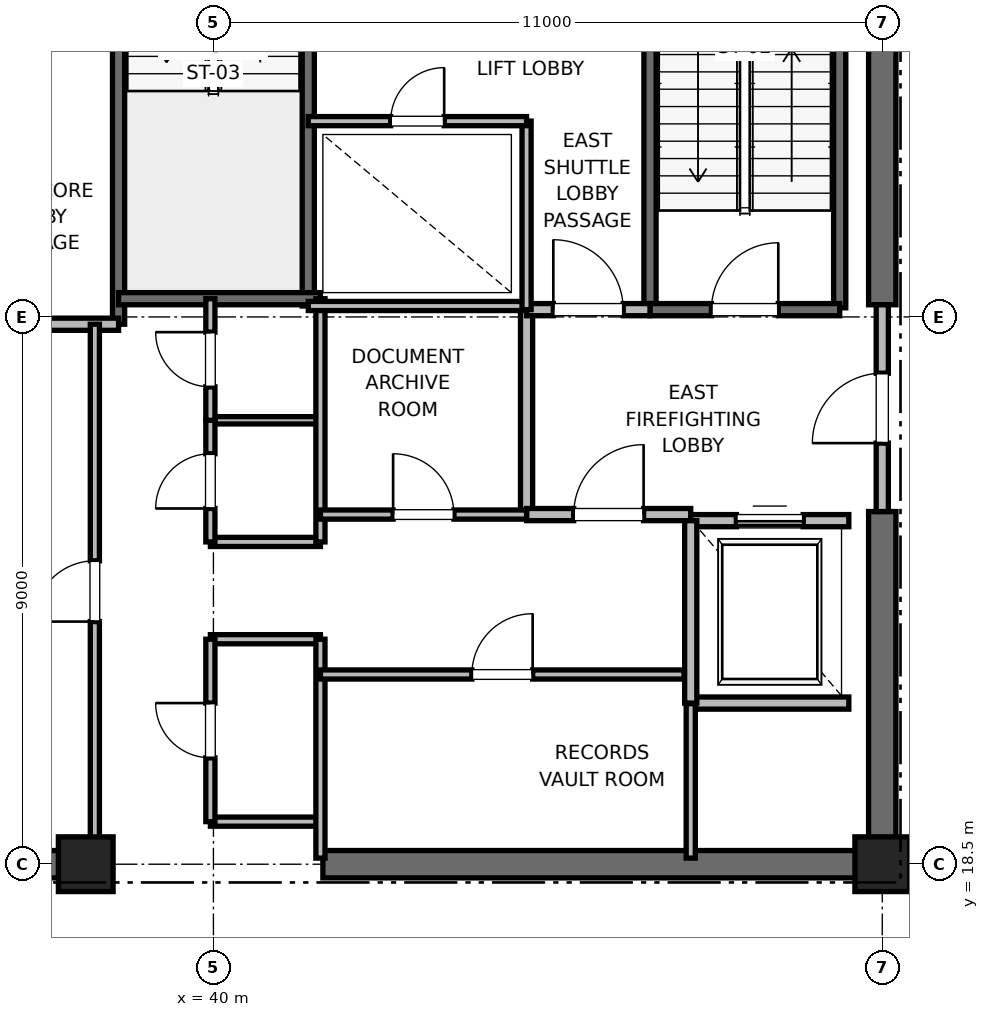
"""IFC4 building model, lengths in metres.
Left out: names, types, materials, properties, quantities, classifications, styles, units other than length and angle.
Written with IfcOpenShell. Run it as: python <this file> out.ifc"""

import sys

from ifc_helpers import new_model, si_unit, direction, frame, frame_2d, origin, origin_2d, place, context, subcontext, project, spatial, rectangle, extrude, element, fill, save


model = new_model("IFC4")
c1 = context("Model", 3, precision=1e-05, world=origin(), true_north=direction((0.0, 1.0)))
c2 = subcontext(c1, "Body", "Model", "MODEL_VIEW")
j1 = project(units=[si_unit("LENGTHUNIT", "METRE"), si_unit("PLANEANGLEUNIT", "RADIAN")], contexts=[c1])
p1 = place(None, origin())
s1 = spatial("IfcSite", under=j1, at=p1, CompositionType="ELEMENT")
p2 = place(p1, origin())
s2 = spatial("IfcBuilding", under=s1, at=p2, CompositionType="ELEMENT")
p3 = place(p2, frame((0.0, 0.0, 263.2)))
s3 = spatial("IfcBuildingStorey", under=s2, at=p3, CompositionType="ELEMENT", Elevation=263.2)
for number, where, z_axis, x_axis in (
    (1, (51.0, 18.5, 0.0), (0.0, 0.0, 1.0), (1.0, 0.0, 0.0)),
    (2, (37.9, 18.5, 0.0), (0.0, 0.0, 1.0), (1.0, 0.0, 0.0)),
):
    element("IfcColumn", number, at=place(p3, frame(where, z_axis=z_axis, x_axis=x_axis)), inside=s3, PredefinedType="PILASTER", context=c2, shape_type="SweptSolid", body=[
        extrude(rectangle(XDim=0.9, YDim=0.9, at=origin_2d()), origin(), (0.0, 0.0, 1.0), 4.0),
    ])
for number, where, z_axis, x_axis in (
    (3, (29.0, 18.5, 0.0), (0.0, 0.0, 1.0), (1.0, 0.0, 0.0)),
    (4, (41.8, 18.5, 0.0), (0.0, 0.0, 1.0), (1.0, 0.0, 0.0)),
):
    element("IfcWall", number, at=place(p3, frame(where, z_axis=z_axis, x_axis=x_axis)), inside=s3, PredefinedType="SHEAR", context=c2, shape_type="SweptSolid", body=[
        extrude(rectangle(XDim=9.2, YDim=0.45, at=frame_2d((4.6, 0.0))), origin(), (0.0, 0.0, 1.0), 3.785),
    ])
p4 = place(p3, frame((51.0, 18.5, 0.0), z_axis=(0.0, 0.0, 1.0), x_axis=(0.0, 1.0, 0.0)))
e5 = element("IfcWall", 5, at=p4, inside=s3, PredefinedType="SHEAR", context=c2, shape_type="SweptSolid", body=[
    extrude(rectangle(XDim=5.8, YDim=0.45, at=frame_2d((2.9, 0.0))), origin(), (0.0, 0.0, 1.0), 3.785),
])
p5 = place(p3, frame((51.0, 27.7, 0.0), z_axis=(0.0, 0.0, 1.0), x_axis=(0.0, 1.0, 0.0)))
e6 = element("IfcWall", 6, at=p5, inside=s3, PredefinedType="SHEAR", context=c2, shape_type="SweptSolid", body=[
    extrude(rectangle(XDim=8.8, YDim=0.45, at=frame_2d((4.4, 0.0))), origin(), (0.0, 0.0, 1.0), 3.785),
])
p6 = place(p3, frame((50.3, 27.65, 0.0), z_axis=(0.0, 0.0, 1.0), x_axis=(0.0, 1.0, 0.0)))
e7 = element("IfcWall", 7, at=p6, inside=s3, PredefinedType="SOLIDWALL", context=c2, shape_type="SweptSolid", body=[
    extrude(rectangle(XDim=8.15, YDim=0.2, at=frame_2d((4.075, 0.0))), origin(), (0.0, 0.0, 1.0), 3.785),
])
p7 = place(p3, frame((47.18, 27.62, 0.0), z_axis=(0.0, 0.0, 1.0), x_axis=(0.0, 1.0, 0.0)))
e8 = element("IfcWall", 8, at=p7, inside=s3, PredefinedType="SOLIDWALL", context=c2, shape_type="SweptSolid", body=[
    extrude(rectangle(XDim=8.18, YDim=0.2, at=frame_2d((4.09, 0.0))), origin(), (0.0, 0.0, 1.0), 3.785),
])
p8 = place(p3, frame((47.18, 27.62, 0.0), z_axis=(0.0, 0.0, 1.0), x_axis=(1.0, 0.0, 0.0)))
e9 = element("IfcWall", 9, at=p8, inside=s3, PredefinedType="SOLIDWALL", context=c2, shape_type="SweptSolid", body=[
    extrude(rectangle(XDim=3.12, YDim=0.2, at=frame_2d((1.56, 0.0))), origin(), (0.0, 0.0, 1.0), 3.785),
])
p9 = place(p8, frame((1.01, 0.0, 0.0)))
e10 = element("IfcOpeningElement", 10, at=p9, cuts=e9, PredefinedType="OPENING", context=c2, shape_type="SweptSolid", body=[
    extrude(rectangle(XDim=1.1, YDim=2.15, at=frame_2d((0.55, 1.075))), frame((0.0, 0.1, 0.0), z_axis=(0.0, -1.0, 0.0), x_axis=(1.0, 0.0, 0.0)), (0.0, 0.0, 1.0), 0.2),
])
p10 = place(p3, frame((38.44, 27.38, 0.0), z_axis=(0.0, 0.0, 1.0), x_axis=(0.0, 1.0, 0.0)))
e11 = element("IfcWall", 11, at=p10, inside=s3, PredefinedType="SOLIDWALL", context=c2, shape_type="SweptSolid", body=[
    extrude(rectangle(XDim=8.87, YDim=0.2, at=frame_2d((4.435, 0.0))), origin(), (0.0, 0.0, 1.0), 3.785),
])
p11 = place(p3, frame((41.56, 27.68, 0.0), z_axis=(0.0, 0.0, 1.0), x_axis=(0.0, 1.0, 0.0)))
e12 = element("IfcWall", 12, at=p11, inside=s3, PredefinedType="SOLIDWALL", context=c2, shape_type="SweptSolid", body=[
    extrude(rectangle(XDim=8.57, YDim=0.2, at=frame_2d((4.285, 0.0))), origin(), (0.0, 0.0, 1.0), 3.785),
])
p12 = place(p3, frame((38.44, 27.8, 0.0), z_axis=(0.0, 0.0, 1.0), x_axis=(1.0, 0.0, 0.0)))
e13 = element("IfcWall", 13, at=p12, inside=s3, PredefinedType="SOLIDWALL", context=c2, shape_type="SweptSolid", body=[
    extrude(rectangle(XDim=3.32, YDim=0.2, at=frame_2d((1.66, 0.0))), origin(), (0.0, 0.0, 1.0), 3.785),
])
p13 = place(p3, frame((32.82, 27.38, 0.0), z_axis=(0.0, 0.0, 1.0), x_axis=(1.0, 0.0, 0.0)))
e14 = element("IfcWall", 14, at=p13, inside=s3, PredefinedType="PARTITIONING", context=c2, shape_type="SweptSolid", body=[
    extrude(rectangle(XDim=5.62, YDim=0.2, at=frame_2d((2.81, 0.0))), origin(), (0.0, 0.0, 1.0), 3.785),
])
p14 = place(p3, frame((45.15, 24.25, 0.0), z_axis=(0.0, 0.0, 1.0), x_axis=(0.0, 1.0, 0.0)))
e15 = element("IfcWall", 15, at=p14, inside=s3, PredefinedType="PARTITIONING", context=c2, shape_type="SweptSolid", body=[
    extrude(rectangle(XDim=3.37, YDim=0.2, at=frame_2d((1.685, 0.0))), origin(), (0.0, 0.0, 1.0), 3.785),
])
p15 = place(p3, frame((45.15, 24.25, 0.0), z_axis=(0.0, 0.0, 1.0), x_axis=(1.0, 0.0, 0.0)))
e16 = element("IfcWall", 16, at=p15, inside=s3, PredefinedType="PARTITIONING", context=c2, shape_type="SweptSolid", body=[
    extrude(rectangle(XDim=2.7, YDim=0.2, at=frame_2d((1.35, 0.0))), origin(), (0.0, 0.0, 1.0), 3.785),
])
p16 = place(p15, frame((0.775, 0.0, 0.0)))
e17 = element("IfcOpeningElement", 17, at=p16, cuts=e16, PredefinedType="OPENING", context=c2, shape_type="SweptSolid", body=[
    extrude(rectangle(XDim=1.15, YDim=2.2, at=frame_2d((0.575, 1.1))), frame((0.0, 0.1, 0.0), z_axis=(0.0, -1.0, 0.0), x_axis=(1.0, 0.0, 0.0)), (0.0, 0.0, 1.0), 0.2),
])
p17 = place(p3, frame((45.15, 27.62, 0.0), z_axis=(0.0, 0.0, 1.0), x_axis=(1.0, 0.0, 0.0)))
e18 = element("IfcWall", 18, at=p17, inside=s3, PredefinedType="PARTITIONING", context=c2, shape_type="SweptSolid", body=[
    extrude(rectangle(XDim=2.03, YDim=0.2, at=frame_2d((1.015, 0.0))), origin(), (0.0, 0.0, 1.0), 3.785),
])
p18 = place(p17, frame((0.44, 0.0, 0.0)))
e19 = element("IfcOpeningElement", 19, at=p18, cuts=e18, PredefinedType="OPENING", context=c2, shape_type="SweptSolid", body=[
    extrude(rectangle(XDim=1.15, YDim=2.2, at=frame_2d((0.575, 1.1))), frame((0.0, 0.1, 0.0), z_axis=(0.0, -1.0, 0.0), x_axis=(1.0, 0.0, 0.0)), (0.0, 0.0, 1.0), 0.2),
])
p19 = place(p3, frame((51.0, 24.3, 0.0), z_axis=(0.0, 0.0, 1.0), x_axis=(0.0, 1.0, 0.0)))
e20 = element("IfcWall", 20, at=p19, inside=s3, PredefinedType="PARTITIONING", context=c2, shape_type="SweptSolid", body=[
    extrude(rectangle(XDim=3.4, YDim=0.2, at=frame_2d((1.7, 0.0))), origin(), (0.0, 0.0, 1.0), 2.865),
])
p20 = place(p19, frame((1.125, 0.0, 0.0)))
e21 = element("IfcOpeningElement", 21, at=p20, cuts=e20, PredefinedType="OPENING", context=c2, shape_type="SweptSolid", body=[
    extrude(rectangle(XDim=1.15, YDim=2.2, at=frame_2d((0.575, 1.1))), frame((0.0, 0.1, 0.0), z_axis=(0.0, -1.0, 0.0), x_axis=(1.0, 0.0, 0.0)), (0.0, 0.0, 1.0), 0.2),
])
p21 = place(p3, frame((47.85, 21.15, 0.0), z_axis=(0.0, 0.0, 1.0), x_axis=(1.0, 0.0, 0.0)))
e22 = element("IfcWall", 22, at=p21, inside=s3, PredefinedType="SOLIDWALL", context=c2, shape_type="SweptSolid", body=[
    extrude(rectangle(XDim=2.6, YDim=0.2, at=frame_2d((1.3, 0.0))), origin(), (0.0, 0.0, 1.0), 3.785),
])
p22 = place(p3, frame((50.45, 24.15, 0.0), z_axis=(0.0, 0.0, 1.0), x_axis=(-1.0, 0.0, 0.0)))
e23 = element("IfcWall", 23, at=p22, inside=s3, PredefinedType="SOLIDWALL", context=c2, shape_type="SweptSolid", body=[
    extrude(rectangle(XDim=2.6, YDim=0.2, at=frame_2d((1.3, 0.0))), origin(), (0.0, 0.0, 1.0), 2.865),
])
p23 = place(p22, frame((0.75, 0.0, 0.0)))
e24 = element("IfcOpeningElement", 24, at=p23, cuts=e23, PredefinedType="OPENING", context=c2, shape_type="SweptSolid", body=[
    extrude(rectangle(XDim=1.1, YDim=2.2, at=frame_2d((0.55, 1.1))), frame((0.0, 0.1, 0.0), z_axis=(0.0, -1.0, 0.0), x_axis=(1.0, 0.0, 0.0)), (0.0, 0.0, 1.0), 0.2),
])
p24 = place(p3, frame((47.85, 24.15, 0.0), z_axis=(0.0, 0.0, 1.0), x_axis=(0.0, -1.0, 0.0)))
e25 = element("IfcWall", 25, at=p24, inside=s3, PredefinedType="SOLIDWALL", context=c2, shape_type="SweptSolid", body=[
    extrude(rectangle(XDim=3.0, YDim=0.2, at=frame_2d((1.5, 0.0))), origin(), (0.0, 0.0, 1.0), 3.785),
])
for number, where, z_axis, x_axis in (
    (26, (39.95, 19.2, 0.0), (0.0, 0.0, 1.0), (1.0, 0.0, 0.0)),
    (27, (39.95, 22.2, 0.0), (0.0, 0.0, 1.0), (1.0, 0.0, 0.0)),
    (28, (39.95, 23.8, 0.0), (0.0, 0.0, 1.0), (1.0, 0.0, 0.0)),
):
    element("IfcWall", number, at=place(p3, frame(where, z_axis=z_axis, x_axis=x_axis)), inside=s3, PredefinedType="PARTITIONING", context=c2, shape_type="SweptSolid", body=[
        extrude(rectangle(XDim=1.81, YDim=0.15, at=frame_2d((0.905, 0.0))), origin(), (0.0, 0.0, 1.0), 2.85),
    ])
p25 = place(p3, frame((39.95, 25.8, 0.0), z_axis=(0.0, 0.0, 1.0), x_axis=(1.0, 0.0, 0.0)))
e29 = element("IfcWall", 29, at=p25, inside=s3, PredefinedType="PARTITIONING", context=c2, shape_type="SweptSolid", body=[
    extrude(rectangle(XDim=1.81, YDim=0.12, at=frame_2d((0.905, 0.0))), origin(), (0.0, 0.0, 1.0), 2.85),
])
p26 = place(p3, frame((41.76, 18.6, 0.0), z_axis=(0.0, 0.0, 1.0), x_axis=(0.0, 1.0, 0.0)))
e30 = element("IfcWall", 30, at=p26, inside=s3, PredefinedType="PARTITIONING", context=c2, shape_type="SweptSolid", body=[
    extrude(rectangle(XDim=3.6, YDim=0.15, at=frame_2d((1.8, 0.0))), origin(), (0.0, 0.0, 1.0), 2.85),
])
p27 = place(p3, frame((41.76, 23.8, 0.0), z_axis=(0.0, 0.0, 1.0), x_axis=(0.0, 1.0, 0.0)))
e31 = element("IfcWall", 31, at=p27, inside=s3, PredefinedType="PARTITIONING", context=c2, shape_type="SweptSolid", body=[
    extrude(rectangle(XDim=4.0, YDim=0.15, at=frame_2d((2.0, 0.0))), origin(), (0.0, 0.0, 1.0), 2.85),
])
p28 = place(p3, frame((39.95, 19.2, 0.0), z_axis=(0.0, 0.0, 1.0), x_axis=(0.0, 1.0, 0.0)))
e32 = element("IfcWall", 32, at=p28, inside=s3, PredefinedType="PARTITIONING", context=c2, shape_type="SweptSolid", body=[
    extrude(rectangle(XDim=3.0, YDim=0.15, at=frame_2d((1.5, 0.0))), origin(), (0.0, 0.0, 1.0), 2.85),
])
p29 = place(p28, frame((1.05, 0.0, 0.0)))
e33 = element("IfcOpeningElement", 33, at=p29, cuts=e32, PredefinedType="OPENING", context=c2, shape_type="SweptSolid", body=[
    extrude(rectangle(XDim=0.9, YDim=2.1, at=frame_2d((0.45, 1.05))), frame((0.0, 0.075, 0.0), z_axis=(0.0, -1.0, 0.0), x_axis=(1.0, 0.0, 0.0)), (0.0, 0.0, 1.0), 0.15),
])
p30 = place(p3, frame((39.95, 23.8, 0.0), z_axis=(0.0, 0.0, 1.0), x_axis=(0.0, 1.0, 0.0)))
e34 = element("IfcWall", 34, at=p30, inside=s3, PredefinedType="PARTITIONING", context=c2, shape_type="SweptSolid", body=[
    extrude(rectangle(XDim=2.0, YDim=0.15, at=frame_2d((1.0, 0.0))), origin(), (0.0, 0.0, 1.0), 2.85),
])
p31 = place(p30, frame((0.55, 0.0, 0.0)))
e35 = element("IfcOpeningElement", 35, at=p31, cuts=e34, PredefinedType="OPENING", context=c2, shape_type="SweptSolid", body=[
    extrude(rectangle(XDim=0.9, YDim=2.1, at=frame_2d((0.45, 1.05))), frame((0.0, 0.075, 0.0), z_axis=(0.0, -1.0, 0.0), x_axis=(1.0, 0.0, 0.0)), (0.0, 0.0, 1.0), 0.15),
])
p32 = place(p3, frame((39.95, 25.8, 0.0), z_axis=(0.0, 0.0, 1.0), x_axis=(0.0, 1.0, 0.0)))
e36 = element("IfcWall", 36, at=p32, inside=s3, PredefinedType="PARTITIONING", context=c2, shape_type="SweptSolid", body=[
    extrude(rectangle(XDim=2.0, YDim=0.15, at=frame_2d((1.0, 0.0))), origin(), (0.0, 0.0, 1.0), 2.85),
])
p33 = place(p32, frame((0.55, 0.0, 0.0)))
e37 = element("IfcOpeningElement", 37, at=p33, cuts=e36, PredefinedType="OPENING", context=c2, shape_type="SweptSolid", body=[
    extrude(rectangle(XDim=0.9, YDim=2.1, at=frame_2d((0.45, 1.05))), frame((0.0, 0.075, 0.0), z_axis=(0.0, -1.0, 0.0), x_axis=(1.0, 0.0, 0.0)), (0.0, 0.0, 1.0), 0.15),
])
p34 = place(p3, frame((38.05, 18.6, 0.0), z_axis=(0.0, 0.0, 1.0), x_axis=(0.0, 1.0, 0.0)))
e38 = element("IfcWall", 38, at=p34, inside=s3, PredefinedType="PARTITIONING", context=c2, shape_type="SweptSolid", body=[
    extrude(rectangle(XDim=8.78, YDim=0.15, at=frame_2d((4.39, 0.0))), origin(), (0.0, 0.0, 1.0), 2.85),
])
p35 = place(p34, frame((3.89, 0.0, 0.0)))
e39 = element("IfcOpeningElement", 39, at=p35, cuts=e38, PredefinedType="OPENING", context=c2, shape_type="SweptSolid", body=[
    extrude(rectangle(XDim=1.0, YDim=2.15, at=frame_2d((0.5, 1.075))), frame((0.0, 0.075, 0.0), z_axis=(0.0, -1.0, 0.0), x_axis=(1.0, 0.0, 0.0)), (0.0, 0.0, 1.0), 0.15),
])
p36 = place(p3, frame((41.56, 27.68, 0.0), z_axis=(0.0, 0.0, 1.0), x_axis=(1.0, 0.0, 0.0)))
e40 = element("IfcWall", 40, at=p36, inside=s3, PredefinedType="PARTITIONING", context=c2, shape_type="SweptSolid", body=[
    extrude(rectangle(XDim=3.59, YDim=0.15, at=frame_2d((1.795, 0.0))), origin(), (0.0, 0.0, 1.0), 2.85),
])
p37 = place(p3, frame((47.85, 18.6, 0.0), z_axis=(0.0, 0.0, 1.0), x_axis=(0.0, 1.0, 0.0)))
e41 = element("IfcWall", 41, at=p37, inside=s3, PredefinedType="PARTITIONING", context=c2, shape_type="SweptSolid", body=[
    extrude(rectangle(XDim=2.54, YDim=0.15, at=frame_2d((1.27, 0.0))), origin(), (0.0, 0.0, 1.0), 2.85),
])
p38 = place(p3, frame((41.76, 21.62, 0.0), z_axis=(0.0, 0.0, 1.0), x_axis=(1.0, 0.0, 0.0)))
e42 = element("IfcWall", 42, at=p38, inside=s3, PredefinedType="PARTITIONING", context=c2, shape_type="SweptSolid", body=[
    extrude(rectangle(XDim=5.98, YDim=0.15, at=frame_2d((2.99, 0.0))), origin(), (0.0, 0.0, 1.0), 2.85),
])
p39 = place(p38, frame((2.49, 0.0, 0.0)))
e43 = element("IfcOpeningElement", 43, at=p39, cuts=e42, PredefinedType="OPENING", context=c2, shape_type="SweptSolid", body=[
    extrude(rectangle(XDim=1.0, YDim=2.15, at=frame_2d((0.5, 1.075))), frame((0.0, 0.075, 0.0), z_axis=(0.0, -1.0, 0.0), x_axis=(1.0, 0.0, 0.0)), (0.0, 0.0, 1.0), 0.15),
])
p40 = place(p3, frame((41.76, 24.25, 0.0), z_axis=(0.0, 0.0, 1.0), x_axis=(1.0, 0.0, 0.0)))
e44 = element("IfcWall", 44, at=p40, inside=s3, PredefinedType="PARTITIONING", context=c2, shape_type="SweptSolid", body=[
    extrude(rectangle(XDim=3.39, YDim=0.15, at=frame_2d((1.695, 0.0))), origin(), (0.0, 0.0, 1.0), 2.85),
])
p41 = place(p40, frame((1.195, 0.0, 0.0)))
e45 = element("IfcOpeningElement", 45, at=p41, cuts=e44, PredefinedType="OPENING", context=c2, shape_type="SweptSolid", body=[
    extrude(rectangle(XDim=1.0, YDim=2.15, at=frame_2d((0.5, 1.075))), frame((0.0, 0.075, 0.0), z_axis=(0.0, -1.0, 0.0), x_axis=(1.0, 0.0, 0.0)), (0.0, 0.0, 1.0), 0.15),
])
p42 = place(p3, frame((45.15, 27.62, 0.0), z_axis=(0.0, 0.0, 1.0), x_axis=(0.0, 1.0, 0.0)))
e46 = element("IfcWall", 46, at=p42, inside=s3, PredefinedType="PARTITIONING", context=c2, shape_type="SweptSolid", body=[
    extrude(rectangle(XDim=3.1, YDim=0.15, at=frame_2d((1.55, 0.0))), origin(), (0.0, 0.0, 1.0), 2.85),
])
p43 = place(p3, frame((41.56, 30.72, 0.0), z_axis=(0.0, 0.0, 1.0), x_axis=(1.0, 0.0, 0.0)))
e47 = element("IfcWall", 47, at=p43, inside=s3, PredefinedType="PARTITIONING", context=c2, shape_type="SweptSolid", body=[
    extrude(rectangle(XDim=3.59, YDim=0.15, at=frame_2d((1.795, 0.0))), origin(), (0.0, 0.0, 1.0), 2.85),
])
p44 = place(p43, frame((1.355, 0.0, 0.0)))
e48 = element("IfcOpeningElement", 48, at=p44, cuts=e47, PredefinedType="OPENING", context=c2, shape_type="SweptSolid", body=[
    extrude(rectangle(XDim=0.88, YDim=2.1, at=frame_2d((0.44, 1.05))), frame((0.0, 0.075, 0.0), z_axis=(0.0, -1.0, 0.0), x_axis=(1.0, 0.0, 0.0)), (0.0, 0.0, 1.0), 0.15),
])
p45 = place(p9, origin())
e49 = element("IfcDoor", 49, at=p45, inside=s3, OperationType="SINGLE_SWING_RIGHT", PredefinedType="DOOR", context=c2, shape_type="SweptSolid", body=[
    extrude(rectangle(XDim=1.1, YDim=2.15, at=frame_2d((0.55, 1.075))), frame((0.0, 0.025, 0.0), z_axis=(0.0, -1.0, 0.0), x_axis=(1.0, 0.0, 0.0)), (0.0, 0.0, 1.0), 0.05),
])
fill(e10, e49)
p46 = place(p16, origin())
e50 = element("IfcDoor", 50, at=p46, inside=s3, OperationType="SINGLE_SWING_RIGHT", PredefinedType="DOOR", context=c2, shape_type="SweptSolid", body=[
    extrude(rectangle(XDim=1.15, YDim=2.2, at=frame_2d((0.575, 1.1))), frame((0.0, 0.025, 0.0), z_axis=(0.0, -1.0, 0.0), x_axis=(1.0, 0.0, 0.0)), (0.0, 0.0, 1.0), 0.05),
])
fill(e17, e50)
p47 = place(p18, origin())
e51 = element("IfcDoor", 51, at=p47, inside=s3, OperationType="SINGLE_SWING_LEFT", PredefinedType="DOOR", context=c2, shape_type="SweptSolid", body=[
    extrude(rectangle(XDim=1.15, YDim=2.2, at=frame_2d((0.575, 1.1))), frame((0.0, 0.025, 0.0), z_axis=(0.0, -1.0, 0.0), x_axis=(1.0, 0.0, 0.0)), (0.0, 0.0, 1.0), 0.05),
])
fill(e19, e51)
p48 = place(p20, origin())
e52 = element("IfcDoor", 52, at=p48, inside=s3, OperationType="SINGLE_SWING_LEFT", PredefinedType="DOOR", context=c2, shape_type="SweptSolid", body=[
    extrude(rectangle(XDim=1.15, YDim=2.2, at=frame_2d((0.575, 1.1))), frame((0.0, 0.025, 0.0), z_axis=(0.0, -1.0, 0.0), x_axis=(1.0, 0.0, 0.0)), (0.0, 0.0, 1.0), 0.05),
])
fill(e21, e52)
p49 = place(p23, origin())
e53 = element("IfcDoor", 53, at=p49, inside=s3, OperationType="SLIDING_TO_RIGHT", PredefinedType="DOOR", context=c2, shape_type="SweptSolid", body=[
    extrude(rectangle(XDim=1.1, YDim=2.2, at=frame_2d((0.55, 1.1))), frame((0.0, 0.025, 0.0), z_axis=(0.0, -1.0, 0.0), x_axis=(1.0, 0.0, 0.0)), (0.0, 0.0, 1.0), 0.05),
])
fill(e24, e53)
p50 = place(p29, origin())
e54 = element("IfcDoor", 54, at=p50, inside=s3, OperationType="SINGLE_SWING_RIGHT", PredefinedType="DOOR", context=c2, shape_type="SweptSolid", body=[
    extrude(rectangle(XDim=0.9, YDim=2.1, at=frame_2d((0.45, 1.05))), frame((0.0, 0.025, 0.0), z_axis=(0.0, -1.0, 0.0), x_axis=(1.0, 0.0, 0.0)), (0.0, 0.0, 1.0), 0.05),
])
fill(e33, e54)
p51 = place(p31, origin())
e55 = element("IfcDoor", 55, at=p51, inside=s3, OperationType="SINGLE_SWING_LEFT", PredefinedType="DOOR", context=c2, shape_type="SweptSolid", body=[
    extrude(rectangle(XDim=0.9, YDim=2.1, at=frame_2d((0.45, 1.05))), frame((0.0, 0.025, 0.0), z_axis=(0.0, -1.0, 0.0), x_axis=(1.0, 0.0, 0.0)), (0.0, 0.0, 1.0), 0.05),
])
fill(e35, e55)
p52 = place(p33, origin())
e56 = element("IfcDoor", 56, at=p52, inside=s3, OperationType="SINGLE_SWING_RIGHT", PredefinedType="DOOR", context=c2, shape_type="SweptSolid", body=[
    extrude(rectangle(XDim=0.9, YDim=2.1, at=frame_2d((0.45, 1.05))), frame((0.0, 0.025, 0.0), z_axis=(0.0, -1.0, 0.0), x_axis=(1.0, 0.0, 0.0)), (0.0, 0.0, 1.0), 0.05),
])
fill(e37, e56)
p53 = place(p35, origin())
e57 = element("IfcDoor", 57, at=p53, inside=s3, OperationType="SINGLE_SWING_LEFT", PredefinedType="DOOR", context=c2, shape_type="SweptSolid", body=[
    extrude(rectangle(XDim=1.0, YDim=2.15, at=frame_2d((0.5, 1.075))), frame((0.0, 0.025, 0.0), z_axis=(0.0, -1.0, 0.0), x_axis=(1.0, 0.0, 0.0)), (0.0, 0.0, 1.0), 0.05),
])
fill(e39, e57)
p54 = place(p39, origin())
e58 = element("IfcDoor", 58, at=p54, inside=s3, OperationType="SINGLE_SWING_RIGHT", PredefinedType="DOOR", context=c2, shape_type="SweptSolid", body=[
    extrude(rectangle(XDim=1.0, YDim=2.15, at=frame_2d((0.5, 1.075))), frame((0.0, 0.025, 0.0), z_axis=(0.0, -1.0, 0.0), x_axis=(1.0, 0.0, 0.0)), (0.0, 0.0, 1.0), 0.05),
])
fill(e43, e58)
p55 = place(p41, origin())
e59 = element("IfcDoor", 59, at=p55, inside=s3, OperationType="SINGLE_SWING_LEFT", PredefinedType="DOOR", context=c2, shape_type="SweptSolid", body=[
    extrude(rectangle(XDim=1.0, YDim=2.15, at=frame_2d((0.5, 1.075))), frame((0.0, 0.025, 0.0), z_axis=(0.0, -1.0, 0.0), x_axis=(1.0, 0.0, 0.0)), (0.0, 0.0, 1.0), 0.05),
])
fill(e45, e59)
p56 = place(p44, origin())
e60 = element("IfcDoor", 60, at=p56, inside=s3, OperationType="SINGLE_SWING_RIGHT", PredefinedType="DOOR", context=c2, shape_type="SweptSolid", body=[
    extrude(rectangle(XDim=0.88, YDim=2.1, at=frame_2d((0.44, 1.05))), frame((0.0, 0.025, 0.0), z_axis=(0.0, -1.0, 0.0), x_axis=(1.0, 0.0, 0.0)), (0.0, 0.0, 1.0), 0.05),
])
fill(e48, e60)
save(model, sys.argv[1])
